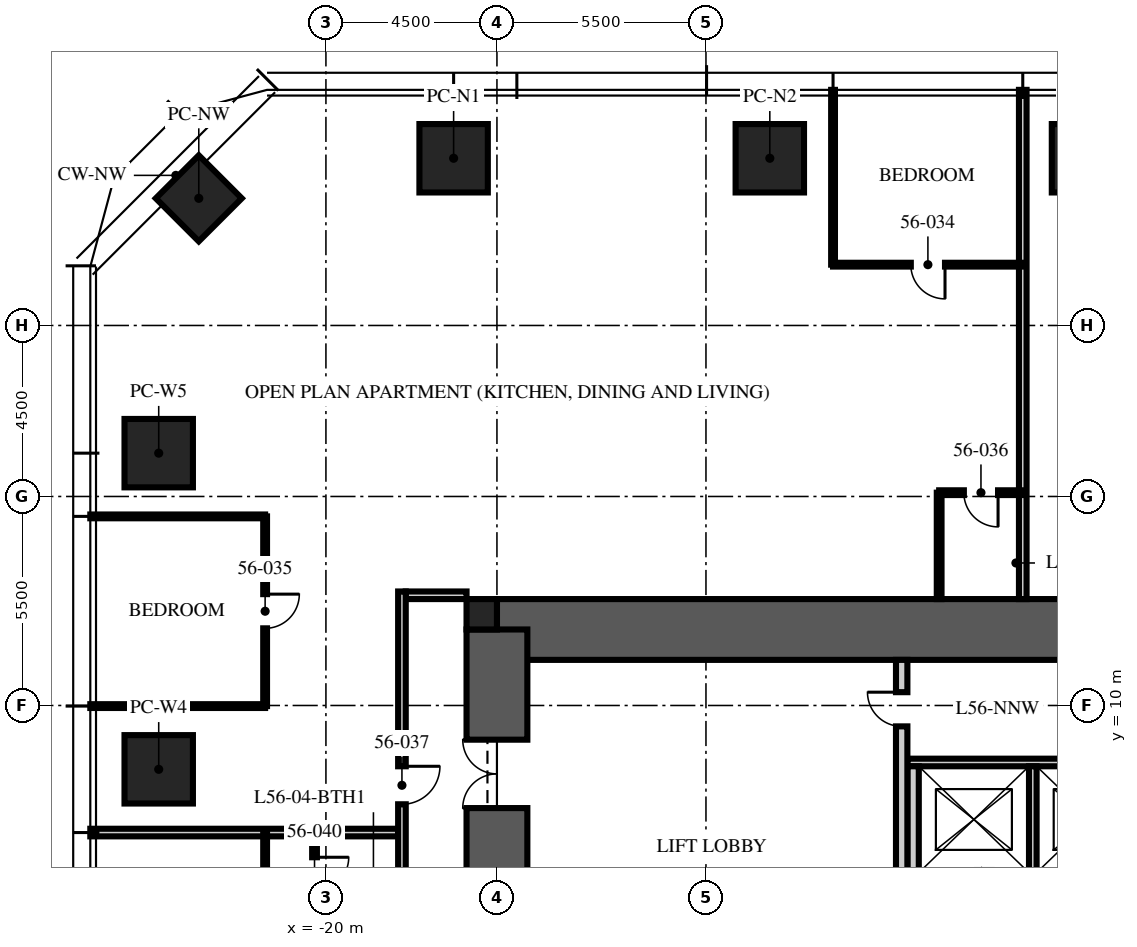
"""IFC4 building model, lengths in metres.
Left out: names, types, materials, properties, quantities, classifications, styles, units other than length and angle.
Written with IfcOpenShell. Run it as: python <this file> out.ifc"""

import sys

from ifc_helpers import new_model, si_unit, direction, frame, frame_2d, origin, origin_2d, place, context, subcontext, project, spatial, rectangle, extrude, element, fill, save


model = new_model("IFC4")
c1 = context("Model", 3, precision=1e-05, world=origin(), true_north=direction((0.0, 1.0)))
c2 = subcontext(c1, "Body", "Model", "MODEL_VIEW")
j1 = project(units=[si_unit("LENGTHUNIT", "METRE"), si_unit("PLANEANGLEUNIT", "RADIAN")], contexts=[c1])
p1 = place(None, origin())
s1 = spatial("IfcSite", under=j1, at=p1, CompositionType="ELEMENT")
p2 = place(p1, origin())
s2 = spatial("IfcBuilding", under=s1, at=p2, CompositionType="ELEMENT")
p3 = place(p2, frame((0.0, 0.0, 225.75)))
s3 = spatial("IfcBuildingStorey", under=s2, at=p3, CompositionType="ELEMENT", Elevation=225.75)
p4 = place(p3, frame((-15.5, 12.0, -0.25), z_axis=(0.0, 0.0, 1.0), x_axis=(1.0, 0.0, 0.0)))
e1 = element("IfcWall", 1, at=p4, inside=s3, PredefinedType="SHEAR", context=c2, shape_type="SweptSolid", body=[
    extrude(rectangle(XDim=31.0, YDim=1.6, at=frame_2d((15.5, 0.0))), origin(), (0.0, 0.0, 1.0), 3.75),
])
p5 = place(p3, frame((-15.5, -12.0, -0.25), z_axis=(0.0, 0.0, 1.0), x_axis=(0.0, 1.0, 0.0)))
e2 = element("IfcWall", 2, at=p5, inside=s3, PredefinedType="SHEAR", context=c2, shape_type="SweptSolid", body=[
    extrude(rectangle(XDim=24.0, YDim=1.6, at=frame_2d((12.0, 0.0))), origin(), (0.0, 0.0, 1.0), 3.75),
])
p6 = place(p5, frame((3.2, 0.0, 0.25)))
e3 = element("IfcOpeningElement", 3, at=p6, cuts=e2, PredefinedType="OPENING", context=c2, shape_type="SweptSolid", body=[
    extrude(rectangle(XDim=1.2, YDim=2.1, at=frame_2d((0.6, 1.05))), frame((0.0, 0.81, 0.0), z_axis=(0.0, -1.0, 0.0), x_axis=(1.0, 0.0, 0.0)), (0.0, 0.0, 1.0), 1.62),
])
p7 = place(p5, frame((19.3, 0.0, 0.25)))
e4 = element("IfcOpeningElement", 4, at=p7, cuts=e2, PredefinedType="OPENING", context=c2, shape_type="SweptSolid", body=[
    extrude(rectangle(XDim=1.8, YDim=2.1, at=frame_2d((0.9, 1.05))), frame((0.0, 0.81, 0.0), z_axis=(0.0, -1.0, 0.0), x_axis=(1.0, 0.0, 0.0)), (0.0, 0.0, 1.0), 1.62),
])
p8 = place(p3, frame((-15.9, 12.4, -0.25), z_axis=(0.0, 0.0, 1.0), x_axis=(1.0, 0.0, 0.0)))
e5 = element("IfcColumn", 5, at=p8, inside=s3, PredefinedType="COLUMN", context=c2, shape_type="SweptSolid", body=[
    extrude(rectangle(XDim=0.8, YDim=0.8, at=origin_2d()), origin(), (0.0, 0.0, 1.0), 3.75),
])
for number, where, z_axis, x_axis in (
    (6, (-16.64, 24.4, 0.0), (0.0, 0.0, 1.0), (1.0, 0.0, 0.0)),
    (7, (-8.32, 24.4, 0.0), (0.0, 0.0, 1.0), (1.0, 0.0, 0.0)),
    (8, (0.0, 24.4, 0.0), (0.0, 0.0, 1.0), (1.0, 0.0, 0.0)),
    (9, (-24.4, 8.32, 0.0), (0.0, 0.0, 1.0), (0.0, 1.0, 0.0)),
    (10, (-24.4, 16.64, 0.0), (0.0, 0.0, 1.0), (0.0, 1.0, 0.0)),
):
    element("IfcColumn", number, at=place(p3, frame(where, z_axis=z_axis, x_axis=x_axis)), inside=s3, PredefinedType="COLUMN", context=c2, shape_type="SweptSolid", body=[
        extrude(rectangle(XDim=1.8, YDim=1.8, at=origin_2d()), origin(), (0.0, 0.0, 1.0), 3.75),
    ])
p9 = place(p3, frame((-23.346, 23.346, 0.0), z_axis=(0.0, 0.0, 1.0), x_axis=(0.707106781187, 0.707106781187, 0.0)))
e11 = element("IfcColumn", 11, at=p9, inside=s3, PredefinedType="COLUMN", context=c2, shape_type="SweptSolid", body=[
    extrude(rectangle(XDim=1.6, YDim=1.6, at=origin_2d()), origin(), (0.0, 0.0, 1.0), 3.75),
])
p10 = place(p3, frame((-4.7, 8.5, 0.0), z_axis=(0.0, 0.0, 1.0), x_axis=(1.0, 0.0, 0.0)))
e12 = element("IfcWall", 12, at=p10, inside=s3, PredefinedType="PARTITIONING", context=c2, shape_type="SweptSolid", body=[
    extrude(rectangle(XDim=9.7, YDim=0.2, at=frame_2d((4.85, 0.0))), origin(), (0.0, 0.0, 1.0), 3.5),
])
p11 = place(p3, frame((-4.55, 5.6, 0.0), z_axis=(0.0, 0.0, 1.0), x_axis=(0.0, 1.0, 0.0)))
e13 = element("IfcWall", 13, at=p11, inside=s3, PredefinedType="PARTITIONING", context=c2, shape_type="SweptSolid", body=[
    extrude(rectangle(XDim=2.8, YDim=0.3, at=frame_2d((1.4, 0.0))), origin(), (0.0, 0.0, 1.0), 3.5),
])
p12 = place(p3, frame((-1.4, 5.6, 0.0), z_axis=(0.0, 0.0, 1.0), x_axis=(0.0, 1.0, 0.0)))
e14 = element("IfcWall", 14, at=p12, inside=s3, PredefinedType="PARTITIONING", context=c2, shape_type="SweptSolid", body=[
    extrude(rectangle(XDim=2.8, YDim=0.2, at=frame_2d((1.4, 0.0))), origin(), (0.0, 0.0, 1.0), 3.5),
])
p13 = place(p3, frame((-4.85, 5.3, 0.0), z_axis=(0.0, 0.0, 1.0), x_axis=(0.0, 1.0, 0.0)))
e15 = element("IfcWall", 15, at=p13, inside=s3, PredefinedType="PARTITIONING", context=c2, shape_type="SweptSolid", body=[
    extrude(rectangle(XDim=5.9, YDim=0.3, at=frame_2d((2.95, 0.0))), origin(), (0.0, 0.0, 1.0), 3.5),
])
p14 = place(p13, frame((4.15, 0.0, 0.0)))
e16 = element("IfcOpeningElement", 16, at=p14, cuts=e15, PredefinedType="OPENING", context=c2, shape_type="SweptSolid", body=[
    extrude(rectangle(XDim=0.9, YDim=2.1, at=frame_2d((0.45, 1.05))), frame((0.0, 0.16, 0.0), z_axis=(0.0, -1.0, 0.0), x_axis=(1.0, 0.0, 0.0)), (0.0, 0.0, 1.0), 0.32),
])
p15 = place(p3, frame((-16.3, 12.9, 0.0), z_axis=(0.0, 0.0, 1.0), x_axis=(-1.0, 0.0, 0.0)))
e17 = element("IfcWall", 17, at=p15, inside=s3, PredefinedType="PARTITIONING", context=c2, shape_type="SweptSolid", body=[
    extrude(rectangle(XDim=1.6, YDim=0.2, at=frame_2d((0.8, 0.0))), origin(), (0.0, 0.0, 1.0), 2.3),
])
p16 = place(p3, frame((-1.664, 12.8, 0.0), z_axis=(0.0, 0.0, 1.0), x_axis=(0.0, 1.0, 0.0)))
e18 = element("IfcWall", 18, at=p16, inside=s3, PredefinedType="PARTITIONING", context=c2, shape_type="SweptSolid", body=[
    extrude(rectangle(XDim=13.4, YDim=0.2, at=frame_2d((6.7, 0.0))), origin(), (0.0, 0.0, 1.0), 2.91),
])
for number, where, z_axis, x_axis in (
    (19, (-6.656, 21.6, 0.0), (0.0, 0.0, 1.0), (0.0, 1.0, 0.0)),
    (20, (-21.6, 14.976, 0.0), (0.0, 0.0, 1.0), (-1.0, 0.0, 0.0)),
    (21, (-21.6, 9.984, 0.0), (0.0, 0.0, 1.0), (-1.0, 0.0, 0.0)),
):
    element("IfcWall", number, at=place(p3, frame(where, z_axis=z_axis, x_axis=x_axis)), inside=s3, PredefinedType="PARTITIONING", context=c2, shape_type="SweptSolid", body=[
        extrude(rectangle(XDim=4.6, YDim=0.1, at=frame_2d((2.3, 0.0))), origin(), (0.0, 0.0, 1.0), 2.91),
    ])
p17 = place(p3, frame((-18.1, 6.656, 0.0), z_axis=(0.0, 0.0, 1.0), x_axis=(-1.0, 0.0, 0.0)))
e22 = element("IfcWall", 22, at=p17, inside=s3, PredefinedType="PARTITIONING", context=c2, shape_type="SweptSolid", body=[
    extrude(rectangle(XDim=8.1, YDim=0.2, at=frame_2d((4.05, 0.0))), origin(), (0.0, 0.0, 1.0), 2.91),
])
p18 = place(p3, frame((-1.664, 21.6, 0.0), z_axis=(0.0, 0.0, 1.0), x_axis=(-1.0, 0.0, 0.0)))
e23 = element("IfcWall", 23, at=p18, inside=s3, PredefinedType="PARTITIONING", context=c2, shape_type="SweptSolid", body=[
    extrude(rectangle(XDim=4.992, YDim=0.1, at=frame_2d((2.496, 0.0))), origin(), (0.0, 0.0, 1.0), 2.81),
])
p19 = place(p18, frame((2.046, 0.0, 0.0)))
e24 = element("IfcOpeningElement", 24, at=p19, cuts=e23, PredefinedType="OPENING", context=c2, shape_type="SweptSolid", body=[
    extrude(rectangle(XDim=0.9, YDim=2.1, at=frame_2d((0.45, 1.05))), frame((0.0, 0.06, 0.0), z_axis=(0.0, -1.0, 0.0), x_axis=(1.0, 0.0, 0.0)), (0.0, 0.0, 1.0), 0.12),
])
p20 = place(p3, frame((-21.6, 14.976, 0.0), z_axis=(0.0, 0.0, 1.0), x_axis=(0.0, -1.0, 0.0)))
e25 = element("IfcWall", 25, at=p20, inside=s3, PredefinedType="PARTITIONING", context=c2, shape_type="SweptSolid", body=[
    extrude(rectangle(XDim=4.992, YDim=0.1, at=frame_2d((2.496, 0.0))), origin(), (0.0, 0.0, 1.0), 2.81),
])
p21 = place(p20, frame((2.046, 0.0, 0.0)))
e26 = element("IfcOpeningElement", 26, at=p21, cuts=e25, PredefinedType="OPENING", context=c2, shape_type="SweptSolid", body=[
    extrude(rectangle(XDim=0.9, YDim=2.1, at=frame_2d((0.45, 1.05))), frame((0.0, 0.06, 0.0), z_axis=(0.0, -1.0, 0.0), x_axis=(1.0, 0.0, 0.0)), (0.0, 0.0, 1.0), 0.12),
])
p22 = place(p3, frame((-1.664, 15.6, 0.0), z_axis=(0.0, 0.0, 1.0), x_axis=(-1.0, 0.0, 0.0)))
e27 = element("IfcWall", 27, at=p22, inside=s3, PredefinedType="PARTITIONING", context=c2, shape_type="SweptSolid", body=[
    extrude(rectangle(XDim=2.2, YDim=0.125, at=frame_2d((1.1, 0.0))), origin(), (0.0, 0.0, 1.0), 3.5),
])
p23 = place(p22, frame((0.65, 0.0, 0.0)))
e28 = element("IfcOpeningElement", 28, at=p23, cuts=e27, PredefinedType="OPENING", context=c2, shape_type="SweptSolid", body=[
    extrude(rectangle(XDim=0.9, YDim=2.1, at=frame_2d((0.45, 1.05))), frame((0.0, 0.073, 0.0), z_axis=(0.0, -1.0, 0.0), x_axis=(1.0, 0.0, 0.0)), (0.0, 0.0, 1.0), 0.145),
])
p24 = place(p3, frame((-3.864, 12.8, 0.0), z_axis=(0.0, 0.0, 1.0), x_axis=(0.0, 1.0, 0.0)))
e29 = element("IfcWall", 29, at=p24, inside=s3, PredefinedType="PARTITIONING", context=c2, shape_type="SweptSolid", body=[
    extrude(rectangle(XDim=2.8, YDim=0.125, at=frame_2d((1.4, 0.0))), origin(), (0.0, 0.0, 1.0), 3.5),
])
p25 = place(p3, frame((-21.6, 6.656, 0.0), z_axis=(0.0, 0.0, 1.0), x_axis=(0.0, -1.0, 0.0)))
e30 = element("IfcWall", 30, at=p25, inside=s3, PredefinedType="PARTITIONING", context=c2, shape_type="SweptSolid", body=[
    extrude(rectangle(XDim=4.992, YDim=0.1, at=frame_2d((2.496, 0.0))), origin(), (0.0, 0.0, 1.0), 2.81),
])
p26 = place(p25, frame((2.046, 0.0, 0.0)))
e31 = element("IfcOpeningElement", 31, at=p26, cuts=e30, PredefinedType="OPENING", context=c2, shape_type="SweptSolid", body=[
    extrude(rectangle(XDim=0.9, YDim=2.1, at=frame_2d((0.45, 1.05))), frame((0.0, 0.06, 0.0), z_axis=(0.0, -1.0, 0.0), x_axis=(1.0, 0.0, 0.0)), (0.0, 0.0, 1.0), 0.12),
])
p27 = place(p3, frame((-20.3, 6.656, 0.0), z_axis=(0.0, 0.0, 1.0), x_axis=(0.0, -1.0, 0.0)))
e32 = element("IfcWall", 32, at=p27, inside=s3, PredefinedType="PARTITIONING", context=c2, shape_type="SweptSolid", body=[
    extrude(rectangle(XDim=2.2, YDim=0.125, at=frame_2d((1.1, 0.0))), origin(), (0.0, 0.0, 1.0), 3.5),
])
p28 = place(p27, frame((0.65, 0.0, 0.0)))
e33 = element("IfcOpeningElement", 33, at=p28, cuts=e32, PredefinedType="OPENING", context=c2, shape_type="SweptSolid", body=[
    extrude(rectangle(XDim=0.9, YDim=2.1, at=frame_2d((0.45, 1.05))), frame((0.0, 0.073, 0.0), z_axis=(0.0, -1.0, 0.0), x_axis=(1.0, 0.0, 0.0)), (0.0, 0.0, 1.0), 0.145),
])
p29 = place(p3, frame((-18.0, 13.0, 0.0), z_axis=(0.0, 0.0, 1.0), x_axis=(0.0, -1.0, 0.0)))
e34 = element("IfcWall", 34, at=p29, inside=s3, PredefinedType="PARTITIONING", context=c2, shape_type="SweptSolid", body=[
    extrude(rectangle(XDim=26.0, YDim=0.2, at=frame_2d((13.0, 0.0))), origin(), (0.0, 0.0, 1.0), 2.6),
])
p30 = place(p29, frame((4.6, 0.0, 0.0)))
e35 = element("IfcOpeningElement", 35, at=p30, cuts=e34, PredefinedType="OPENING", context=c2, shape_type="SweptSolid", body=[
    extrude(rectangle(XDim=1.0, YDim=2.2, at=frame_2d((0.5, 1.1))), frame((0.0, 0.11, 0.0), z_axis=(0.0, -1.0, 0.0), x_axis=(1.0, 0.0, 0.0)), (0.0, 0.0, 1.0), 0.22),
])
p31 = place(p29, frame((21.364, 0.0, 0.0)))
e36 = element("IfcOpeningElement", 36, at=p31, cuts=e34, PredefinedType="OPENING", context=c2, shape_type="SweptSolid", body=[
    extrude(rectangle(XDim=1.0, YDim=2.2, at=frame_2d((0.5, 1.1))), frame((0.0, 0.11, 0.0), z_axis=(0.0, -1.0, 0.0), x_axis=(1.0, 0.0, 0.0)), (0.0, 0.0, 1.0), 0.22),
])
p32 = place(p29, frame((23.754, 0.0, 0.0)))
e37 = element("IfcOpeningElement", 37, at=p32, cuts=e34, PredefinedType="OPENING", context=c2, shape_type="SweptSolid", body=[
    extrude(rectangle(XDim=1.0, YDim=2.2, at=frame_2d((0.5, 1.1))), frame((0.0, 0.11, 0.0), z_axis=(0.0, -1.0, 0.0), x_axis=(1.0, 0.0, 0.0)), (0.0, 0.0, 1.0), 0.22),
])
p33 = place(p7, origin())
e38 = element("IfcDoor", 38, at=p33, inside=s3, OperationType="DOUBLE_DOOR_SINGLE_SWING", PredefinedType="DOOR", context=c2, shape_type="SweptSolid", body=[
    extrude(rectangle(XDim=1.8, YDim=2.1, at=frame_2d((0.9, 1.05))), frame((0.0, 0.025, 0.0), z_axis=(0.0, -1.0, 0.0), x_axis=(1.0, 0.0, 0.0)), (0.0, 0.0, 1.0), 0.05),
])
fill(e4, e38)
p34 = place(p14, origin())
e39 = element("IfcDoor", 39, at=p34, inside=s3, OperationType="SINGLE_SWING_RIGHT", PredefinedType="DOOR", context=c2, shape_type="SweptSolid", body=[
    extrude(rectangle(XDim=0.9, YDim=2.1, at=frame_2d((0.45, 1.05))), frame((0.0, 0.025, 0.0), z_axis=(0.0, -1.0, 0.0), x_axis=(1.0, 0.0, 0.0)), (0.0, 0.0, 1.0), 0.05),
])
fill(e16, e39)
p35 = place(p19, origin())
e40 = element("IfcDoor", 40, at=p35, inside=s3, OperationType="SINGLE_SWING_LEFT", PredefinedType="DOOR", context=c2, shape_type="SweptSolid", body=[
    extrude(rectangle(XDim=0.9, YDim=2.1, at=frame_2d((0.45, 1.05))), frame((0.0, 0.025, 0.0), z_axis=(0.0, -1.0, 0.0), x_axis=(1.0, 0.0, 0.0)), (0.0, 0.0, 1.0), 0.05),
])
fill(e24, e40)
p36 = place(p21, origin())
e41 = element("IfcDoor", 41, at=p36, inside=s3, OperationType="SINGLE_SWING_LEFT", PredefinedType="DOOR", context=c2, shape_type="SweptSolid", body=[
    extrude(rectangle(XDim=0.9, YDim=2.1, at=frame_2d((0.45, 1.05))), frame((0.0, 0.025, 0.0), z_axis=(0.0, -1.0, 0.0), x_axis=(1.0, 0.0, 0.0)), (0.0, 0.0, 1.0), 0.05),
])
fill(e26, e41)
p37 = place(p23, origin())
e42 = element("IfcDoor", 42, at=p37, inside=s3, OperationType="SINGLE_SWING_LEFT", PredefinedType="DOOR", context=c2, shape_type="SweptSolid", body=[
    extrude(rectangle(XDim=0.9, YDim=2.1, at=frame_2d((0.45, 1.05))), frame((0.0, 0.025, 0.0), z_axis=(0.0, -1.0, 0.0), x_axis=(1.0, 0.0, 0.0)), (0.0, 0.0, 1.0), 0.05),
])
fill(e28, e42)
p38 = place(p30, origin())
e43 = element("IfcDoor", 43, at=p38, inside=s3, OperationType="SINGLE_SWING_LEFT", PredefinedType="DOOR", context=c2, shape_type="SweptSolid", body=[
    extrude(rectangle(XDim=1.0, YDim=2.2, at=frame_2d((0.5, 1.1))), frame((0.0, 0.025, 0.0), z_axis=(0.0, -1.0, 0.0), x_axis=(1.0, 0.0, 0.0)), (0.0, 0.0, 1.0), 0.05),
])
fill(e35, e43)
p39 = place(p28, origin())
e44 = element("IfcDoor", 44, at=p39, inside=s3, OperationType="SINGLE_SWING_LEFT", PredefinedType="DOOR", context=c2, shape_type="SweptSolid", body=[
    extrude(rectangle(XDim=0.9, YDim=2.1, at=frame_2d((0.45, 1.05))), frame((0.0, 0.025, 0.0), z_axis=(0.0, -1.0, 0.0), x_axis=(1.0, 0.0, 0.0)), (0.0, 0.0, 1.0), 0.05),
])
fill(e33, e44)
save(model, sys.argv[1])
